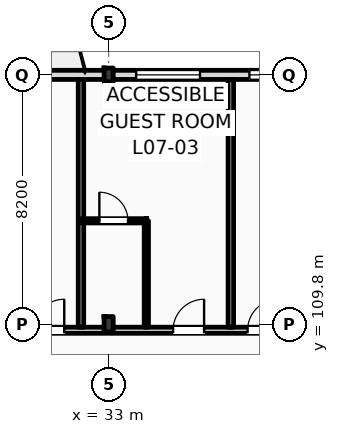
"""IFC4 building model, lengths in metres.
Left out: names, types, materials, properties, quantities, classifications, styles, units other than length and angle.
Written with IfcOpenShell. Run it as: python <this file> out.ifc"""

import sys

from ifc_helpers import new_model, si_unit, direction, frame, frame_2d, origin, origin_2d, place, context, subcontext, project, spatial, rectangle, i_section, extrude, element, fill, save


model = new_model("IFC4")
c1 = context("Model", 3, precision=1e-05, world=origin(), true_north=direction((0.0, 1.0)))
c2 = subcontext(c1, "Body", "Model", "MODEL_VIEW")
j1 = project(units=[si_unit("LENGTHUNIT", "METRE"), si_unit("PLANEANGLEUNIT", "RADIAN")], contexts=[c1])
p1 = place(None, origin())
s1 = spatial("IfcSite", under=j1, at=p1, CompositionType="ELEMENT")
p2 = place(p1, origin())
s2 = spatial("IfcBuilding", under=s1, at=p2, CompositionType="ELEMENT")
p3 = place(p2, frame((0.0, 0.0, 31.8)))
s3 = spatial("IfcBuildingStorey", under=s2, at=p3, CompositionType="ELEMENT", Elevation=31.8)
p4 = place(p3, frame((33.0, 109.8, 0.0), z_axis=(0.0, 0.0, 1.0), x_axis=(1.0, 0.0, 0.0)))
e1 = element("IfcColumn", 1, at=p4, inside=s3, PredefinedType="COLUMN", context=c2, shape_type="SweptSolid", body=[
    extrude(i_section(OverallWidth=0.3, OverallDepth=0.5, WebThickness=0.014, FlangeThickness=0.028, FilletRadius=0.027, at=origin_2d()), origin(), (0.0, 0.0, 1.0), 3.6),
])
p5 = place(p3, frame((33.0, 118.0, 0.0), z_axis=(0.0, 0.0, 1.0), x_axis=(1.0, 0.0, 0.0)))
e2 = element("IfcColumn", 2, at=p5, inside=s3, PredefinedType="COLUMN", context=c2, shape_type="SweptSolid", body=[
    extrude(i_section(OverallWidth=0.3, OverallDepth=0.45, WebThickness=0.014, FlangeThickness=0.026, FilletRadius=0.027, at=origin_2d()), origin(), (0.0, 0.0, 1.0), 3.6),
])
p6 = place(p3, frame((22.5, 118.0, 0.0), z_axis=(0.0, 0.0, 1.0), x_axis=(1.0, 0.0, 0.0)))
e3 = element("IfcWall", 3, at=p6, inside=s3, PredefinedType="STANDARD", context=c2, shape_type="SweptSolid", body=[
    extrude(rectangle(XDim=97.5, YDim=0.3, at=frame_2d((48.75, 0.0))), origin(), (0.0, 0.0, 1.0), 2.72),
])
p7 = place(p6, frame((3.61, 0.0, 0.9)))
e4 = element("IfcOpeningElement", 4, at=p7, cuts=e3, PredefinedType="OPENING", context=c2, shape_type="SweptSolid", body=[
    extrude(rectangle(XDim=1.1, YDim=1.64, at=frame_2d((0.55, 0.82))), frame((0.0, 0.16, 0.0), z_axis=(0.0, -1.0, 0.0), x_axis=(1.0, 0.0, 0.0)), (0.0, 0.0, 1.0), 0.32),
])
p8 = place(p6, frame((6.855, 0.0, 0.0)))
e5 = element("IfcOpeningElement", 5, at=p8, cuts=e3, PredefinedType="OPENING", context=c2, shape_type="SweptSolid", body=[
    extrude(rectangle(XDim=1.2, YDim=2.25, at=frame_2d((0.6, 1.125))), frame((0.0, 0.16, 0.0), z_axis=(0.0, -1.0, 0.0), x_axis=(1.0, 0.0, 0.0)), (0.0, 0.0, 1.0), 0.32),
])
p9 = place(p6, frame((11.405, 0.0, 0.9)))
e6 = element("IfcOpeningElement", 6, at=p9, cuts=e3, PredefinedType="OPENING", context=c2, shape_type="SweptSolid", body=[
    extrude(rectangle(XDim=2.1, YDim=1.64, at=frame_2d((1.05, 0.82))), frame((0.0, 0.16, 0.0), z_axis=(0.0, -1.0, 0.0), x_axis=(1.0, 0.0, 0.0)), (0.0, 0.0, 1.0), 0.32),
])
p10 = place(p6, frame((15.13, 0.0, 0.9)))
e7 = element("IfcOpeningElement", 7, at=p10, cuts=e3, PredefinedType="OPENING", context=c2, shape_type="SweptSolid", body=[
    extrude(rectangle(XDim=2.25, YDim=1.64, at=frame_2d((1.125, 0.82))), frame((0.0, 0.16, 0.0), z_axis=(0.0, -1.0, 0.0), x_axis=(1.0, 0.0, 0.0)), (0.0, 0.0, 1.0), 0.32),
])
p11 = place(p6, frame((21.53, 0.0, 0.0)))
e8 = element("IfcOpeningElement", 8, at=p11, cuts=e3, PredefinedType="OPENING", context=c2, shape_type="SweptSolid", body=[
    extrude(rectangle(XDim=1.2, YDim=2.25, at=frame_2d((0.6, 1.125))), frame((0.0, 0.16, 0.0), z_axis=(0.0, -1.0, 0.0), x_axis=(1.0, 0.0, 0.0)), (0.0, 0.0, 1.0), 0.32),
])
p12 = place(p6, frame((24.18, 0.0, 0.9)))
e9 = element("IfcOpeningElement", 9, at=p12, cuts=e3, PredefinedType="OPENING", context=c2, shape_type="SweptSolid", body=[
    extrude(rectangle(XDim=1.1, YDim=1.64, at=frame_2d((0.55, 0.82))), frame((0.0, 0.16, 0.0), z_axis=(0.0, -1.0, 0.0), x_axis=(1.0, 0.0, 0.0)), (0.0, 0.0, 1.0), 0.32),
])
p13 = place(p6, frame((29.105, 0.0, 0.9)))
e10 = element("IfcOpeningElement", 10, at=p13, cuts=e3, PredefinedType="OPENING", context=c2, shape_type="SweptSolid", body=[
    extrude(rectangle(XDim=2.7, YDim=1.64, at=frame_2d((1.35, 0.82))), frame((0.0, 0.16, 0.0), z_axis=(0.0, -1.0, 0.0), x_axis=(1.0, 0.0, 0.0)), (0.0, 0.0, 1.0), 0.32),
])
p14 = place(p6, frame((34.83, 0.0, 0.9)))
e11 = element("IfcOpeningElement", 11, at=p14, cuts=e3, PredefinedType="OPENING", context=c2, shape_type="SweptSolid", body=[
    extrude(rectangle(XDim=1.8, YDim=1.64, at=frame_2d((0.9, 0.82))), frame((0.0, 0.16, 0.0), z_axis=(0.0, -1.0, 0.0), x_axis=(1.0, 0.0, 0.0)), (0.0, 0.0, 1.0), 0.32),
])
p15 = place(p6, frame((38.525, 0.0, 0.0)))
e12 = element("IfcOpeningElement", 12, at=p15, cuts=e3, PredefinedType="OPENING", context=c2, shape_type="SweptSolid", body=[
    extrude(rectangle(XDim=1.2, YDim=2.25, at=frame_2d((0.6, 1.125))), frame((0.0, 0.16, 0.0), z_axis=(0.0, -1.0, 0.0), x_axis=(1.0, 0.0, 0.0)), (0.0, 0.0, 1.0), 0.32),
])
p16 = place(p6, frame((42.73, 0.0, 0.9)))
e13 = element("IfcOpeningElement", 13, at=p16, cuts=e3, PredefinedType="OPENING", context=c2, shape_type="SweptSolid", body=[
    extrude(rectangle(XDim=3.05, YDim=1.64, at=frame_2d((1.525, 0.82))), frame((0.0, 0.16, 0.0), z_axis=(0.0, -1.0, 0.0), x_axis=(1.0, 0.0, 0.0)), (0.0, 0.0, 1.0), 0.32),
])
p17 = place(p6, frame((47.155, 0.0, 0.9)))
e14 = element("IfcOpeningElement", 14, at=p17, cuts=e3, PredefinedType="OPENING", context=c2, shape_type="SweptSolid", body=[
    extrude(rectangle(XDim=1.35, YDim=1.64, at=frame_2d((0.675, 0.82))), frame((0.0, 0.16, 0.0), z_axis=(0.0, -1.0, 0.0), x_axis=(1.0, 0.0, 0.0)), (0.0, 0.0, 1.0), 0.32),
])
p18 = place(p6, frame((53.065, 0.0, 0.0)))
e15 = element("IfcOpeningElement", 15, at=p18, cuts=e3, PredefinedType="OPENING", context=c2, shape_type="SweptSolid", body=[
    extrude(rectangle(XDim=1.2, YDim=2.25, at=frame_2d((0.6, 1.125))), frame((0.0, 0.16, 0.0), z_axis=(0.0, -1.0, 0.0), x_axis=(1.0, 0.0, 0.0)), (0.0, 0.0, 1.0), 0.32),
])
p19 = place(p6, frame((58.2, 0.0, 0.9)))
e16 = element("IfcOpeningElement", 16, at=p19, cuts=e3, PredefinedType="OPENING", context=c2, shape_type="SweptSolid", body=[
    extrude(rectangle(XDim=1.8, YDim=1.64, at=frame_2d((0.9, 0.82))), frame((0.0, 0.16, 0.0), z_axis=(0.0, -1.0, 0.0), x_axis=(1.0, 0.0, 0.0)), (0.0, 0.0, 1.0), 0.32),
])
p20 = place(p6, frame((61.13, 0.0, 0.9)))
e17 = element("IfcOpeningElement", 17, at=p20, cuts=e3, PredefinedType="OPENING", context=c2, shape_type="SweptSolid", body=[
    extrude(rectangle(XDim=3.05, YDim=1.64, at=frame_2d((1.525, 0.82))), frame((0.0, 0.16, 0.0), z_axis=(0.0, -1.0, 0.0), x_axis=(1.0, 0.0, 0.0)), (0.0, 0.0, 1.0), 0.32),
])
p21 = place(p6, frame((67.93, 0.0, 0.0)))
e18 = element("IfcOpeningElement", 18, at=p21, cuts=e3, PredefinedType="OPENING", context=c2, shape_type="SweptSolid", body=[
    extrude(rectangle(XDim=1.2, YDim=2.25, at=frame_2d((0.6, 1.125))), frame((0.0, 0.16, 0.0), z_axis=(0.0, -1.0, 0.0), x_axis=(1.0, 0.0, 0.0)), (0.0, 0.0, 1.0), 0.32),
])
p22 = place(p6, frame((70.39, 0.0, 0.0)))
e19 = element("IfcOpeningElement", 19, at=p22, cuts=e3, PredefinedType="OPENING", context=c2, shape_type="SweptSolid", body=[
    extrude(rectangle(XDim=1.2, YDim=2.25, at=frame_2d((0.6, 1.125))), frame((0.0, 0.16, 0.0), z_axis=(0.0, -1.0, 0.0), x_axis=(1.0, 0.0, 0.0)), (0.0, 0.0, 1.0), 0.32),
])
p23 = place(p6, frame((75.905, 0.0, 0.9)))
e20 = element("IfcOpeningElement", 20, at=p23, cuts=e3, PredefinedType="OPENING", context=c2, shape_type="SweptSolid", body=[
    extrude(rectangle(XDim=1.1, YDim=1.5, at=frame_2d((0.55, 0.75))), frame((0.0, 0.16, 0.0), z_axis=(0.0, -1.0, 0.0), x_axis=(1.0, 0.0, 0.0)), (0.0, 0.0, 1.0), 0.32),
])
p24 = place(p6, frame((81.63, 0.0, 0.9)))
e21 = element("IfcOpeningElement", 21, at=p24, cuts=e3, PredefinedType="OPENING", context=c2, shape_type="SweptSolid", body=[
    extrude(rectangle(XDim=1.1, YDim=1.6, at=frame_2d((0.55, 0.8))), frame((0.0, 0.16, 0.0), z_axis=(0.0, -1.0, 0.0), x_axis=(1.0, 0.0, 0.0)), (0.0, 0.0, 1.0), 0.32),
])
p25 = place(p6, frame((84.955, 0.0, 0.9)))
e22 = element("IfcOpeningElement", 22, at=p25, cuts=e3, PredefinedType="OPENING", context=c2, shape_type="SweptSolid", body=[
    extrude(rectangle(XDim=1.4, YDim=1.64, at=frame_2d((0.7, 0.82))), frame((0.0, 0.16, 0.0), z_axis=(0.0, -1.0, 0.0), x_axis=(1.0, 0.0, 0.0)), (0.0, 0.0, 1.0), 0.32),
])
p26 = place(p6, frame((90.055, 0.0, 0.9)))
e23 = element("IfcOpeningElement", 23, at=p26, cuts=e3, PredefinedType="OPENING", context=c2, shape_type="SweptSolid", body=[
    extrude(rectangle(XDim=1.6, YDim=1.64, at=frame_2d((0.8, 0.82))), frame((0.0, 0.16, 0.0), z_axis=(0.0, -1.0, 0.0), x_axis=(1.0, 0.0, 0.0)), (0.0, 0.0, 1.0), 0.32),
])
p27 = place(p6, frame((93.87, 0.0, 0.9)))
e24 = element("IfcOpeningElement", 24, at=p27, cuts=e3, PredefinedType="OPENING", context=c2, shape_type="SweptSolid", body=[
    extrude(rectangle(XDim=1.75, YDim=1.64, at=frame_2d((0.875, 0.82))), frame((0.0, 0.16, 0.0), z_axis=(0.0, -1.0, 0.0), x_axis=(1.0, 0.0, 0.0)), (0.0, 0.0, 1.0), 0.32),
])
p28 = place(p3, frame((10.65, 109.6, 0.0), z_axis=(0.0, 0.0, 1.0), x_axis=(1.0, 0.0, 0.0)))
e25 = element("IfcWall", 25, at=p28, inside=s3, PredefinedType="PARTITIONING", context=c2, shape_type="SweptSolid", body=[
    extrude(rectangle(XDim=109.21, YDim=0.2, at=frame_2d((54.605, 0.0))), origin(), (0.0, 0.0, 1.0), 2.72),
])
p29 = place(p28, frame((15.825, 0.0, 0.0)))
e26 = element("IfcOpeningElement", 26, at=p29, cuts=e25, PredefinedType="OPENING", context=c2, shape_type="SweptSolid", body=[
    extrude(rectangle(XDim=1.02, YDim=2.2, at=frame_2d((0.51, 1.1))), frame((0.0, 0.11, 0.0), z_axis=(0.0, -1.0, 0.0), x_axis=(1.0, 0.0, 0.0)), (0.0, 0.0, 1.0), 0.22),
])
p30 = place(p28, frame((19.87, 0.0, 0.0)))
e27 = element("IfcOpeningElement", 27, at=p30, cuts=e25, PredefinedType="OPENING", context=c2, shape_type="SweptSolid", body=[
    extrude(rectangle(XDim=1.02, YDim=2.2, at=frame_2d((0.51, 1.1))), frame((0.0, 0.11, 0.0), z_axis=(0.0, -1.0, 0.0), x_axis=(1.0, 0.0, 0.0)), (0.0, 0.0, 1.0), 0.22),
])
p31 = place(p28, frame((24.47, 0.0, 0.0)))
e28 = element("IfcOpeningElement", 28, at=p31, cuts=e25, PredefinedType="OPENING", context=c2, shape_type="SweptSolid", body=[
    extrude(rectangle(XDim=1.02, YDim=2.2, at=frame_2d((0.51, 1.1))), frame((0.0, 0.11, 0.0), z_axis=(0.0, -1.0, 0.0), x_axis=(1.0, 0.0, 0.0)), (0.0, 0.0, 1.0), 0.22),
])
p32 = place(p28, frame((26.92, 0.0, 0.0)))
e29 = element("IfcOpeningElement", 29, at=p32, cuts=e25, PredefinedType="OPENING", context=c2, shape_type="SweptSolid", body=[
    extrude(rectangle(XDim=1.02, YDim=2.2, at=frame_2d((0.51, 1.1))), frame((0.0, 0.11, 0.0), z_axis=(0.0, -1.0, 0.0), x_axis=(1.0, 0.0, 0.0)), (0.0, 0.0, 1.0), 0.22),
])
p33 = place(p28, frame((33.7, 0.0, 0.0)))
e30 = element("IfcOpeningElement", 30, at=p33, cuts=e25, PredefinedType="OPENING", context=c2, shape_type="SweptSolid", body=[
    extrude(rectangle(XDim=0.96, YDim=2.2, at=frame_2d((0.48, 1.1))), frame((0.0, 0.11, 0.0), z_axis=(0.0, -1.0, 0.0), x_axis=(1.0, 0.0, 0.0)), (0.0, 0.0, 1.0), 0.22),
])
p34 = place(p28, frame((35.9, 0.0, 0.0)))
e31 = element("IfcOpeningElement", 31, at=p34, cuts=e25, PredefinedType="OPENING", context=c2, shape_type="SweptSolid", body=[
    extrude(rectangle(XDim=0.96, YDim=2.2, at=frame_2d((0.48, 1.1))), frame((0.0, 0.11, 0.0), z_axis=(0.0, -1.0, 0.0), x_axis=(1.0, 0.0, 0.0)), (0.0, 0.0, 1.0), 0.22),
])
p35 = place(p28, frame((42.9, 0.0, 0.0)))
e32 = element("IfcOpeningElement", 32, at=p35, cuts=e25, PredefinedType="OPENING", context=c2, shape_type="SweptSolid", body=[
    extrude(rectangle(XDim=0.96, YDim=2.2, at=frame_2d((0.48, 1.1))), frame((0.0, 0.11, 0.0), z_axis=(0.0, -1.0, 0.0), x_axis=(1.0, 0.0, 0.0)), (0.0, 0.0, 1.0), 0.22),
])
p36 = place(p28, frame((47.5, 0.0, 0.0)))
e33 = element("IfcOpeningElement", 33, at=p36, cuts=e25, PredefinedType="OPENING", context=c2, shape_type="SweptSolid", body=[
    extrude(rectangle(XDim=0.96, YDim=2.2, at=frame_2d((0.48, 1.1))), frame((0.0, 0.11, 0.0), z_axis=(0.0, -1.0, 0.0), x_axis=(1.0, 0.0, 0.0)), (0.0, 0.0, 1.0), 0.22),
])
p37 = place(p28, frame((49.95, 0.0, 0.0)))
e34 = element("IfcOpeningElement", 34, at=p37, cuts=e25, PredefinedType="OPENING", context=c2, shape_type="SweptSolid", body=[
    extrude(rectangle(XDim=0.96, YDim=2.2, at=frame_2d((0.48, 1.1))), frame((0.0, 0.11, 0.0), z_axis=(0.0, -1.0, 0.0), x_axis=(1.0, 0.0, 0.0)), (0.0, 0.0, 1.0), 0.22),
])
p38 = place(p28, frame((56.7, 0.0, 0.0)))
e35 = element("IfcOpeningElement", 35, at=p38, cuts=e25, PredefinedType="OPENING", context=c2, shape_type="SweptSolid", body=[
    extrude(rectangle(XDim=0.96, YDim=2.2, at=frame_2d((0.48, 1.1))), frame((0.0, 0.11, 0.0), z_axis=(0.0, -1.0, 0.0), x_axis=(1.0, 0.0, 0.0)), (0.0, 0.0, 1.0), 0.22),
])
p39 = place(p28, frame((59.15, 0.0, 0.0)))
e36 = element("IfcOpeningElement", 36, at=p39, cuts=e25, PredefinedType="OPENING", context=c2, shape_type="SweptSolid", body=[
    extrude(rectangle(XDim=0.96, YDim=2.2, at=frame_2d((0.48, 1.1))), frame((0.0, 0.11, 0.0), z_axis=(0.0, -1.0, 0.0), x_axis=(1.0, 0.0, 0.0)), (0.0, 0.0, 1.0), 0.22),
])
p40 = place(p28, frame((65.9, 0.0, 0.0)))
e37 = element("IfcOpeningElement", 37, at=p40, cuts=e25, PredefinedType="OPENING", context=c2, shape_type="SweptSolid", body=[
    extrude(rectangle(XDim=0.96, YDim=2.2, at=frame_2d((0.48, 1.1))), frame((0.0, 0.11, 0.0), z_axis=(0.0, -1.0, 0.0), x_axis=(1.0, 0.0, 0.0)), (0.0, 0.0, 1.0), 0.22),
])
p41 = place(p28, frame((70.5, 0.0, 0.0)))
e38 = element("IfcOpeningElement", 38, at=p41, cuts=e25, PredefinedType="OPENING", context=c2, shape_type="SweptSolid", body=[
    extrude(rectangle(XDim=0.96, YDim=2.2, at=frame_2d((0.48, 1.1))), frame((0.0, 0.11, 0.0), z_axis=(0.0, -1.0, 0.0), x_axis=(1.0, 0.0, 0.0)), (0.0, 0.0, 1.0), 0.22),
])
p42 = place(p28, frame((72.95, 0.0, 0.0)))
e39 = element("IfcOpeningElement", 39, at=p42, cuts=e25, PredefinedType="OPENING", context=c2, shape_type="SweptSolid", body=[
    extrude(rectangle(XDim=0.96, YDim=2.2, at=frame_2d((0.48, 1.1))), frame((0.0, 0.11, 0.0), z_axis=(0.0, -1.0, 0.0), x_axis=(1.0, 0.0, 0.0)), (0.0, 0.0, 1.0), 0.22),
])
p43 = place(p28, frame((79.7, 0.0, 0.0)))
e40 = element("IfcOpeningElement", 40, at=p43, cuts=e25, PredefinedType="OPENING", context=c2, shape_type="SweptSolid", body=[
    extrude(rectangle(XDim=0.96, YDim=2.2, at=frame_2d((0.48, 1.1))), frame((0.0, 0.11, 0.0), z_axis=(0.0, -1.0, 0.0), x_axis=(1.0, 0.0, 0.0)), (0.0, 0.0, 1.0), 0.22),
])
p44 = place(p28, frame((82.15, 0.0, 0.0)))
e41 = element("IfcOpeningElement", 41, at=p44, cuts=e25, PredefinedType="OPENING", context=c2, shape_type="SweptSolid", body=[
    extrude(rectangle(XDim=0.96, YDim=2.2, at=frame_2d((0.48, 1.1))), frame((0.0, 0.11, 0.0), z_axis=(0.0, -1.0, 0.0), x_axis=(1.0, 0.0, 0.0)), (0.0, 0.0, 1.0), 0.22),
])
p45 = place(p28, frame((88.9, 0.0, 0.0)))
e42 = element("IfcOpeningElement", 42, at=p45, cuts=e25, PredefinedType="OPENING", context=c2, shape_type="SweptSolid", body=[
    extrude(rectangle(XDim=0.96, YDim=2.2, at=frame_2d((0.48, 1.1))), frame((0.0, 0.11, 0.0), z_axis=(0.0, -1.0, 0.0), x_axis=(1.0, 0.0, 0.0)), (0.0, 0.0, 1.0), 0.22),
])
p46 = place(p28, frame((93.75, 0.0, 0.0)))
e43 = element("IfcOpeningElement", 43, at=p46, cuts=e25, PredefinedType="OPENING", context=c2, shape_type="SweptSolid", body=[
    extrude(rectangle(XDim=0.96, YDim=2.2, at=frame_2d((0.48, 1.1))), frame((0.0, 0.11, 0.0), z_axis=(0.0, -1.0, 0.0), x_axis=(1.0, 0.0, 0.0)), (0.0, 0.0, 1.0), 0.22),
])
p47 = place(p28, frame((98.1, 0.0, 0.0)))
e44 = element("IfcOpeningElement", 44, at=p47, cuts=e25, PredefinedType="OPENING", context=c2, shape_type="SweptSolid", body=[
    extrude(rectangle(XDim=0.96, YDim=2.2, at=frame_2d((0.48, 1.1))), frame((0.0, 0.11, 0.0), z_axis=(0.0, -1.0, 0.0), x_axis=(1.0, 0.0, 0.0)), (0.0, 0.0, 1.0), 0.22),
])
p48 = place(p28, frame((102.7, 0.0, 0.0)))
e45 = element("IfcOpeningElement", 45, at=p48, cuts=e25, PredefinedType="OPENING", context=c2, shape_type="SweptSolid", body=[
    extrude(rectangle(XDim=0.96, YDim=2.2, at=frame_2d((0.48, 1.1))), frame((0.0, 0.11, 0.0), z_axis=(0.0, -1.0, 0.0), x_axis=(1.0, 0.0, 0.0)), (0.0, 0.0, 1.0), 0.22),
])
p49 = place(p28, frame((105.04, 0.0, 0.0)))
e46 = element("IfcOpeningElement", 46, at=p49, cuts=e25, PredefinedType="OPENING", context=c2, shape_type="SweptSolid", body=[
    extrude(rectangle(XDim=0.96, YDim=2.2, at=frame_2d((0.48, 1.1))), frame((0.0, 0.11, 0.0), z_axis=(0.0, -1.0, 0.0), x_axis=(1.0, 0.0, 0.0)), (0.0, 0.0, 1.0), 0.22),
])
p50 = place(p28, frame((2.716, 0.0, 0.0)))
e47 = element("IfcOpeningElement", 47, at=p50, cuts=e25, PredefinedType="OPENING", context=c2, shape_type="SweptSolid", body=[
    extrude(rectangle(XDim=1.35, YDim=2.25, at=frame_2d((0.675, 1.125))), frame((0.0, 0.11, 0.0), z_axis=(0.0, -1.0, 0.0), x_axis=(1.0, 0.0, 0.0)), (0.0, 0.0, 1.0), 0.22),
])
p51 = place(p28, frame((6.65, 0.0, 0.0)))
e48 = element("IfcOpeningElement", 48, at=p51, cuts=e25, PredefinedType="OPENING", context=c2, shape_type="SweptSolid", body=[
    extrude(rectangle(XDim=1.35, YDim=2.25, at=frame_2d((0.675, 1.125))), frame((0.0, 0.11, 0.0), z_axis=(0.0, -1.0, 0.0), x_axis=(1.0, 0.0, 0.0)), (0.0, 0.0, 1.0), 0.22),
])
p52 = place(p28, frame((10.583, 0.0, 0.0)))
e49 = element("IfcOpeningElement", 49, at=p52, cuts=e25, PredefinedType="OPENING", context=c2, shape_type="SweptSolid", body=[
    extrude(rectangle(XDim=1.35, YDim=2.25, at=frame_2d((0.675, 1.125))), frame((0.0, 0.11, 0.0), z_axis=(0.0, -1.0, 0.0), x_axis=(1.0, 0.0, 0.0)), (0.0, 0.0, 1.0), 0.22),
])
for number, where, z_axis, x_axis in (
    (50, (32.09, 109.7, 0.0), (0.0, 0.0, 1.0), (0.0, 1.0, 0.0)),
    (51, (37.02, 109.7, 0.0), (0.0, 0.0, 1.0), (0.0, 1.0, 0.0)),
):
    element("IfcWall", number, at=place(p3, frame(where, z_axis=z_axis, x_axis=x_axis)), inside=s3, PredefinedType="PARTITIONING", context=c2, shape_type="SweptSolid", body=[
        extrude(rectangle(XDim=8.15, YDim=0.18, at=frame_2d((4.075, 0.0))), origin(), (0.0, 0.0, 1.0), 3.36),
    ])
p53 = place(p3, frame((34.24, 109.7, 0.0), z_axis=(0.0, 0.0, 1.0), x_axis=(0.0, 1.0, 0.0)))
e52 = element("IfcWall", 52, at=p53, inside=s3, PredefinedType="PARTITIONING", context=c2, shape_type="SweptSolid", body=[
    extrude(rectangle(XDim=3.5, YDim=0.14, at=frame_2d((1.75, 0.0))), origin(), (0.0, 0.0, 1.0), 3.36),
])
p54 = place(p3, frame((32.09, 113.2, 0.0), z_axis=(0.0, 0.0, 1.0), x_axis=(1.0, 0.0, 0.0)))
e53 = element("IfcWall", 53, at=p54, inside=s3, PredefinedType="PARTITIONING", context=c2, shape_type="SweptSolid", body=[
    extrude(rectangle(XDim=2.15, YDim=0.14, at=frame_2d((1.075, 0.0))), origin(), (0.0, 0.0, 1.0), 3.36),
])
p55 = place(p54, frame((0.605, 0.0, 0.0)))
e54 = element("IfcOpeningElement", 54, at=p55, cuts=e53, PredefinedType="OPENING", context=c2, shape_type="SweptSolid", body=[
    extrude(rectangle(XDim=0.94, YDim=2.15, at=frame_2d((0.47, 1.075))), frame((0.0, 0.08, 0.0), z_axis=(0.0, -1.0, 0.0), x_axis=(1.0, 0.0, 0.0)), (0.0, 0.0, 1.0), 0.16),
])
p56 = place(p9, origin())
e55 = element("IfcWindow", 55, at=p56, inside=s3, PartitioningType="DOUBLE_PANEL_VERTICAL", PredefinedType="WINDOW", context=c2, shape_type="SweptSolid", body=[
    extrude(rectangle(XDim=2.1, YDim=1.64, at=frame_2d((1.05, 0.82))), frame((0.0, 0.03, 0.0), z_axis=(0.0, -1.0, 0.0), x_axis=(1.0, 0.0, 0.0)), (0.0, 0.0, 1.0), 0.06),
])
fill(e6, e55)
p57 = place(p10, origin())
e56 = element("IfcWindow", 56, at=p57, inside=s3, PartitioningType="DOUBLE_PANEL_VERTICAL", PredefinedType="WINDOW", context=c2, shape_type="SweptSolid", body=[
    extrude(rectangle(XDim=2.25, YDim=1.64, at=frame_2d((1.125, 0.82))), frame((0.0, 0.03, 0.0), z_axis=(0.0, -1.0, 0.0), x_axis=(1.0, 0.0, 0.0)), (0.0, 0.0, 1.0), 0.06),
])
fill(e7, e56)
p58 = place(p30, origin())
e57 = element("IfcDoor", 57, at=p58, inside=s3, OperationType="SINGLE_SWING_RIGHT", PredefinedType="DOOR", context=c2, shape_type="SweptSolid", body=[
    extrude(rectangle(XDim=1.02, YDim=2.2, at=frame_2d((0.51, 1.1))), frame((0.0, 0.025, 0.0), z_axis=(0.0, -1.0, 0.0), x_axis=(1.0, 0.0, 0.0)), (0.0, 0.0, 1.0), 0.05),
])
fill(e27, e57)
p59 = place(p31, origin())
e58 = element("IfcDoor", 58, at=p59, inside=s3, OperationType="SINGLE_SWING_RIGHT", PredefinedType="DOOR", context=c2, shape_type="SweptSolid", body=[
    extrude(rectangle(XDim=1.02, YDim=2.2, at=frame_2d((0.51, 1.1))), frame((0.0, 0.025, 0.0), z_axis=(0.0, -1.0, 0.0), x_axis=(1.0, 0.0, 0.0)), (0.0, 0.0, 1.0), 0.05),
])
fill(e28, e58)
p60 = place(p55, origin())
e59 = element("IfcDoor", 59, at=p60, inside=s3, OperationType="SINGLE_SWING_LEFT", PredefinedType="DOOR", context=c2, shape_type="SweptSolid", body=[
    extrude(rectangle(XDim=0.94, YDim=2.15, at=frame_2d((0.47, 1.075))), frame((0.0, 0.025, 0.0), z_axis=(0.0, -1.0, 0.0), x_axis=(1.0, 0.0, 0.0)), (0.0, 0.0, 1.0), 0.05),
])
fill(e54, e59)
p61 = place(p32, origin())
e60 = element("IfcDoor", 60, at=p61, inside=s3, OperationType="SINGLE_SWING_RIGHT", PredefinedType="DOOR", context=c2, shape_type="SweptSolid", body=[
    extrude(rectangle(XDim=1.02, YDim=2.2, at=frame_2d((0.51, 1.1))), frame((0.0, 0.025, 0.0), z_axis=(0.0, -1.0, 0.0), x_axis=(1.0, 0.0, 0.0)), (0.0, 0.0, 1.0), 0.05),
])
fill(e29, e60)
save(model, sys.argv[1])
